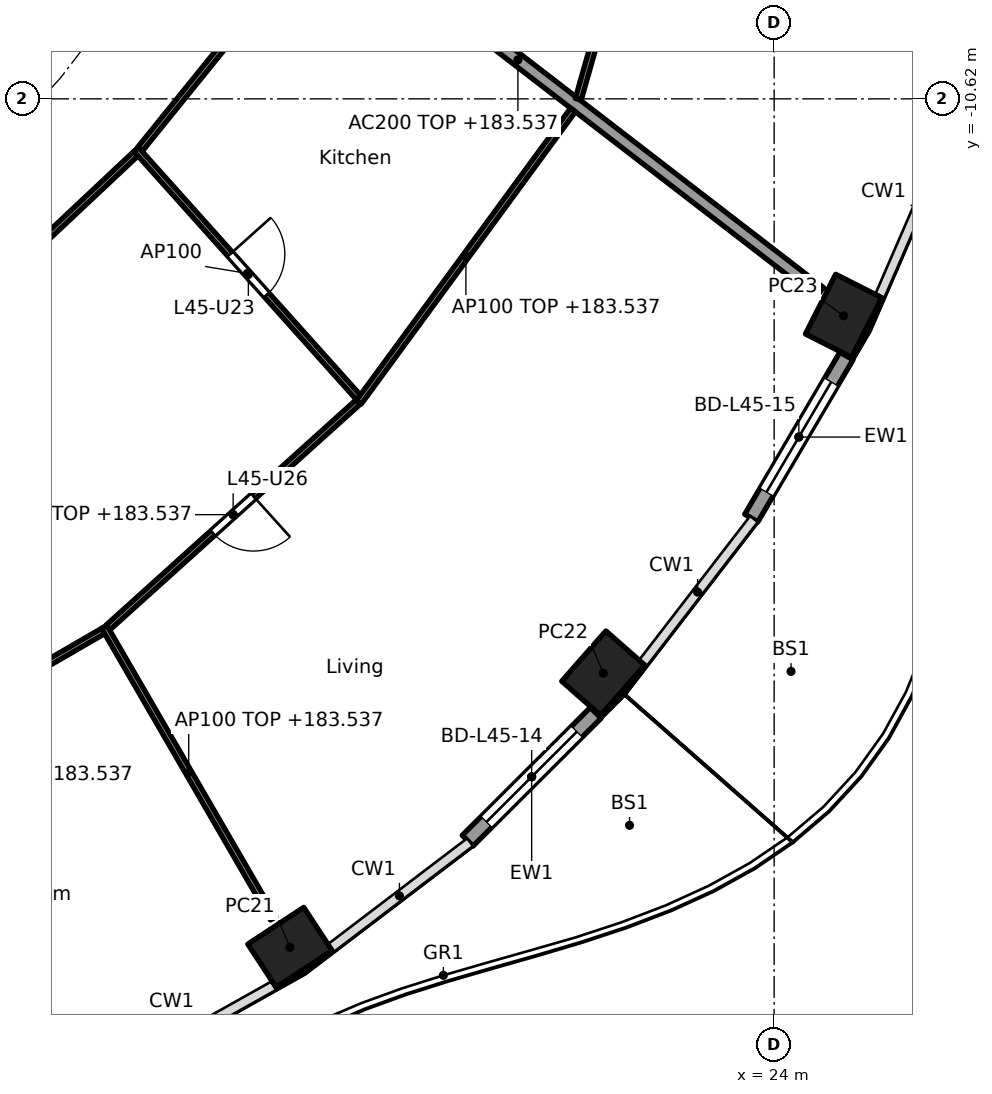
"""IFC4 building model, lengths in metres.
Left out: names, types, materials, properties, quantities, classifications, styles, units other than length and angle.
Written with IfcOpenShell. Run it as: python <this file> out.ifc"""

import sys

from ifc_helpers import new_model, si_unit, direction, frame, frame_2d, origin, origin_2d, place, context, subcontext, project, spatial, rectangle, hollow_rectangle, extrude, element, fill, save


model = new_model("IFC4")
c1 = context("Model", 3, precision=1e-05, world=origin(), true_north=direction((0.0, 1.0)))
c2 = subcontext(c1, "Body", "Model", "MODEL_VIEW")
j1 = project(units=[si_unit("LENGTHUNIT", "METRE"), si_unit("PLANEANGLEUNIT", "RADIAN")], contexts=[c1])
p1 = place(None, origin())
s1 = spatial("IfcSite", under=j1, at=p1, CompositionType="ELEMENT")
p2 = place(p1, origin())
s2 = spatial("IfcBuilding", under=s1, at=p2, CompositionType="ELEMENT")
p3 = place(p2, frame((0.0, 0.0, 180.7)))
s3 = spatial("IfcBuildingStorey", under=s2, at=p3, CompositionType="ELEMENT", Elevation=180.7)
for number, where, z_axis, x_axis in (
    (1, (16.038, -24.573, 0.0), (0.0, 0.0, 1.0), (0.836, 0.549, 0.0)),
    (2, (21.189, -20.064, 0.0), (0.0, 0.0, 1.0), (0.66, 0.751, 0.0)),
    (3, (25.142, -14.188, 0.0), (0.0, 0.0, 1.0), (0.452, 0.892, 0.0)),
):
    element("IfcColumn", number, at=place(p3, frame(where, z_axis=z_axis, x_axis=x_axis)), inside=s3, PredefinedType="COLUMN", context=c2, shape_type="SweptSolid", body=[
        extrude(hollow_rectangle(XDim=1.1, YDim=0.85, WallThickness=0.036, at=origin_2d()), origin(), (0.0, 0.0, 1.0), 3.7),
    ])
p4 = place(p3, frame((21.065, -20.718, 0.0), z_axis=(0.0, 0.0, 1.0), x_axis=(-0.707844845069, -0.706367946122, 0.0)))
e4 = element("IfcWall", 4, at=p4, inside=s3, PredefinedType="SOLIDWALL", context=c2, shape_type="SweptSolid", body=[
    extrude(rectangle(XDim=2.976, YDim=0.25, at=frame_2d((1.488, 0.0))), origin(), (0.0, 0.0, 1.0), 3.44),
])
p5 = place(p4, frame((0.438, 0.0, 0.0)))
e5 = element("IfcOpeningElement", 5, at=p5, cuts=e4, PredefinedType="OPENING", context=c2, shape_type="SweptSolid", body=[
    extrude(rectangle(XDim=2.1, YDim=2.4, at=frame_2d((1.05, 1.2))), frame((0.0, 0.135, 0.0), z_axis=(0.0, -1.0, 0.0), x_axis=(1.0, 0.0, 0.0)), (0.0, 0.0, 1.0), 0.27),
])
p6 = place(p3, frame((25.189, -14.848, 0.0), z_axis=(0.0, 0.0, 1.0), x_axis=(-0.506367803691, -0.862317602386, 0.0)))
e6 = element("IfcWall", 6, at=p6, inside=s3, PredefinedType="SOLIDWALL", context=c2, shape_type="SweptSolid", body=[
    extrude(rectangle(XDim=3.092, YDim=0.25, at=frame_2d((1.546, 0.0))), origin(), (0.0, 0.0, 1.0), 3.44),
])
p7 = place(p6, frame((0.496, 0.0, 0.0)))
e7 = element("IfcOpeningElement", 7, at=p7, cuts=e6, PredefinedType="OPENING", context=c2, shape_type="SweptSolid", body=[
    extrude(rectangle(XDim=2.1, YDim=2.4, at=frame_2d((1.05, 1.2))), frame((0.0, 0.135, 0.0), z_axis=(0.0, -1.0, 0.0), x_axis=(1.0, 0.0, 0.0)), (0.0, 0.0, 1.0), 0.27),
])
p8 = place(p3, frame((14.822, -6.154, 0.0), z_axis=(0.0, 0.0, 1.0), x_axis=(0.792203056092, -0.610257583254, 0.0)))
e8 = element("IfcWall", 8, at=p8, inside=s3, PredefinedType="PARTITIONING", context=c2, shape_type="SweptSolid", body=[
    extrude(rectangle(XDim=12.533, YDim=0.2, at=frame_2d((6.266, 0.0))), origin(), (0.0, 0.0, 1.0), 2.837),
])
p9 = place(p3, frame((5.275, -12.494, 0.0), z_axis=(0.0, 0.0, 1.0), x_axis=(0.707106781187, 0.707106781187, 0.0)))
e9 = element("IfcWall", 9, at=p9, inside=s3, PredefinedType="PARTITIONING", context=c2, shape_type="SweptSolid", body=[
    extrude(rectangle(XDim=10.409, YDim=0.2, at=frame_2d((5.205, 0.0))), origin(), (0.0, 0.0, 1.0), 3.44),
])
p10 = place(p3, frame((8.405, -22.013, 0.0), z_axis=(0.0, 0.0, 1.0), x_axis=(0.865277177388, 0.501293732547, 0.0)))
e10 = element("IfcWall", 10, at=p10, inside=s3, PredefinedType="PARTITIONING", context=c2, shape_type="SweptSolid", body=[
    extrude(rectangle(XDim=5.27, YDim=0.1, at=frame_2d((2.635, 0.0))), origin(), (0.0, 0.0, 1.0), 2.837),
])
p11 = place(p3, frame((10.21, -14.614, 0.0), z_axis=(0.0, 0.0, 1.0), x_axis=(0.728883199496, 0.684638066055, 0.0)))
e11 = element("IfcWall", 11, at=p11, inside=s3, PredefinedType="PARTITIONING", context=c2, shape_type="SweptSolid", body=[
    extrude(rectangle(XDim=4.519, YDim=0.1, at=frame_2d((2.26, 0.0))), origin(), (0.0, 0.0, 1.0), 2.837),
])
p12 = place(p3, frame((12.983, -19.303, 0.0), z_axis=(0.0, 0.0, 1.0), x_axis=(0.501315846071, -0.865264365659, 0.0)))
e12 = element("IfcWall", 12, at=p12, inside=s3, PredefinedType="PARTITIONING", context=c2, shape_type="SweptSolid", body=[
    extrude(rectangle(XDim=5.542, YDim=0.1, at=frame_2d((2.771, 0.0))), origin(), (0.0, 0.0, 1.0), 2.837),
])
p13 = place(p3, frame((13.045, -19.313, 0.0), z_axis=(0.0, 0.0, 1.0), x_axis=(0.742790086539, 0.66952437397, 0.0)))
e13 = element("IfcWall", 13, at=p13, inside=s3, PredefinedType="PARTITIONING", context=c2, shape_type="SweptSolid", body=[
    extrude(rectangle(XDim=5.542, YDim=0.1, at=frame_2d((2.771, 0.0))), origin(), (0.0, 0.0, 1.0), 2.837),
])
p14 = place(p13, frame((2.321, 0.0, 0.0)))
e14 = element("IfcOpeningElement", 14, at=p14, cuts=e13, PredefinedType="OPENING", context=c2, shape_type="SweptSolid", body=[
    extrude(rectangle(XDim=0.9, YDim=2.1, at=frame_2d((0.45, 1.05))), frame((0.0, 0.06, 0.0), z_axis=(0.0, -1.0, 0.0), x_axis=(1.0, 0.0, 0.0)), (0.0, 0.0, 1.0), 0.12),
])
p15 = place(p3, frame((13.507, -11.449, 0.0), z_axis=(0.0, 0.0, 1.0), x_axis=(0.667299792168, -0.744789223453, 0.0)))
e15 = element("IfcWall", 15, at=p15, inside=s3, PredefinedType="PARTITIONING", context=c2, shape_type="SweptSolid", body=[
    extrude(rectangle(XDim=5.482, YDim=0.1, at=frame_2d((2.741, 0.0))), origin(), (0.0, 0.0, 1.0), 3.44),
])
p16 = place(p15, frame((2.316, 0.0, 0.0)))
e16 = element("IfcOpeningElement", 16, at=p16, cuts=e15, PredefinedType="OPENING", context=c2, shape_type="SweptSolid", body=[
    extrude(rectangle(XDim=0.9, YDim=2.1, at=frame_2d((0.45, 1.05))), frame((0.0, 0.06, 0.0), z_axis=(0.0, -1.0, 0.0), x_axis=(1.0, 0.0, 0.0)), (0.0, 0.0, 1.0), 0.12),
])
p17 = place(p3, frame((13.572, -11.447, 0.0), z_axis=(0.0, 0.0, 1.0), x_axis=(0.628738316533, 0.777616955399, 0.0)))
e17 = element("IfcWall", 17, at=p17, inside=s3, PredefinedType="PARTITIONING", context=c2, shape_type="SweptSolid", body=[
    extrude(rectangle(XDim=4.857, YDim=0.1, at=frame_2d((2.429, 0.0))), origin(), (0.0, 0.0, 1.0), 2.837),
])
p18 = place(p3, frame((17.169, -15.609, 0.0), z_axis=(0.0, 0.0, 1.0), x_axis=(0.591122127251, 0.806582066918, 0.0)))
e18 = element("IfcWall", 18, at=p18, inside=s3, PredefinedType="PARTITIONING", context=c2, shape_type="SweptSolid", body=[
    extrude(rectangle(XDim=5.96, YDim=0.1, at=frame_2d((2.98, 0.0))), origin(), (0.0, 0.0, 1.0), 2.837),
])
p19 = place(p3, frame((20.779, -10.625, 0.0), z_axis=(0.0, 0.0, 1.0), x_axis=(0.273819702124, 0.961781040949, 0.0)))
e19 = element("IfcWall", 19, at=p19, inside=s3, PredefinedType="PARTITIONING", context=c2, shape_type="SweptSolid", body=[
    extrude(rectangle(XDim=5.152, YDim=0.1, at=frame_2d((2.576, 0.0))), origin(), (0.0, 0.0, 1.0), 2.837),
])
p20 = place(p19, frame((2.126, 0.0, 0.0)))
e20 = element("IfcOpeningElement", 20, at=p20, cuts=e19, PredefinedType="OPENING", context=c2, shape_type="SweptSolid", body=[
    extrude(rectangle(XDim=0.9, YDim=2.1, at=frame_2d((0.45, 1.05))), frame((0.0, 0.06, 0.0), z_axis=(0.0, -1.0, 0.0), x_axis=(1.0, 0.0, 0.0)), (0.0, 0.0, 1.0), 0.12),
])
p21 = place(p5, origin())
e21 = element("IfcDoor", 21, at=p21, inside=s3, OperationType="SLIDING_TO_LEFT", PredefinedType="DOOR", context=c2, shape_type="SweptSolid", body=[
    extrude(rectangle(XDim=2.1, YDim=2.4, at=frame_2d((1.05, 1.2))), frame((0.0, 0.025, 0.0), z_axis=(0.0, -1.0, 0.0), x_axis=(1.0, 0.0, 0.0)), (0.0, 0.0, 1.0), 0.05),
])
fill(e5, e21)
p22 = place(p7, origin())
e22 = element("IfcDoor", 22, at=p22, inside=s3, OperationType="SLIDING_TO_LEFT", PredefinedType="DOOR", context=c2, shape_type="SweptSolid", body=[
    extrude(rectangle(XDim=2.1, YDim=2.4, at=frame_2d((1.05, 1.2))), frame((0.0, 0.025, 0.0), z_axis=(0.0, -1.0, 0.0), x_axis=(1.0, 0.0, 0.0)), (0.0, 0.0, 1.0), 0.05),
])
fill(e7, e22)
p23 = place(p16, origin())
e23 = element("IfcDoor", 23, at=p23, inside=s3, OperationType="SINGLE_SWING_LEFT", PredefinedType="DOOR", context=c2, shape_type="SweptSolid", body=[
    extrude(rectangle(XDim=0.9, YDim=2.1, at=frame_2d((0.45, 1.05))), frame((0.0, 0.025, 0.0), z_axis=(0.0, -1.0, 0.0), x_axis=(1.0, 0.0, 0.0)), (0.0, 0.0, 1.0), 0.05),
])
fill(e16, e23)
p24 = place(p14, frame((0.9, 0.0, 0.0), x_axis=(-1.0, 0.0, 0.0)))
e24 = element("IfcDoor", 24, at=p24, inside=s3, OperationType="SINGLE_SWING_LEFT", PredefinedType="DOOR", context=c2, shape_type="SweptSolid", body=[
    extrude(rectangle(XDim=0.9, YDim=2.1, at=frame_2d((0.45, 1.05))), frame((0.0, 0.025, 0.0), z_axis=(0.0, -1.0, 0.0), x_axis=(1.0, 0.0, 0.0)), (0.0, 0.0, 1.0), 0.05),
])
fill(e14, e24)
save(model, sys.argv[1])
